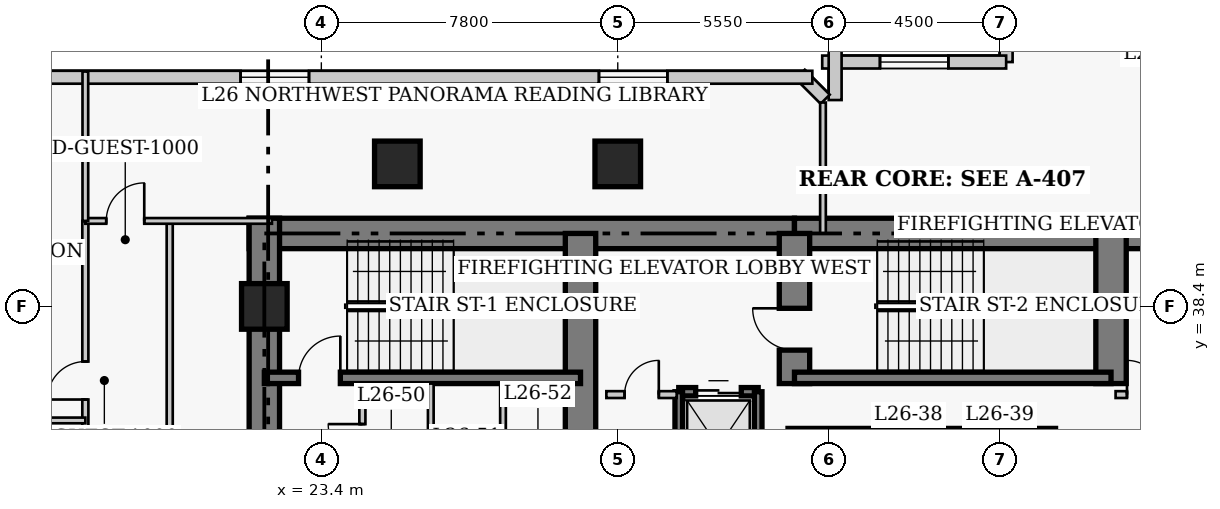
"""IFC4 building model, lengths in metres.
Left out: names, types, materials, properties, quantities, classifications, styles, units other than length and angle.
Written with IfcOpenShell. Run it as: python <this file> out.ifc"""

import sys

from ifc_helpers import new_model, si_unit, direction, frame, frame_2d, origin, origin_2d, place, context, subcontext, project, spatial, rectangle, extrude, element, fill, save


model = new_model("IFC4")
c1 = context("Model", 3, precision=1e-05, world=origin(), true_north=direction((0.0, 1.0)))
c2 = subcontext(c1, "Body", "Model", "MODEL_VIEW")
j1 = project(units=[si_unit("LENGTHUNIT", "METRE"), si_unit("PLANEANGLEUNIT", "RADIAN")], contexts=[c1])
p1 = place(None, origin())
s1 = spatial("IfcSite", under=j1, at=p1, CompositionType="ELEMENT")
p2 = place(p1, origin())
s2 = spatial("IfcBuilding", under=s1, at=p2, CompositionType="ELEMENT")
p3 = place(p2, frame((0.0, 0.0, 107.0)))
s3 = spatial("IfcBuildingStorey", under=s2, at=p3, CompositionType="ELEMENT", Elevation=107.0)
p4 = place(p3, frame((21.5, 40.32, 0.0), z_axis=(0.0, 0.0, 1.0), x_axis=(1.0, 0.0, 0.0)))
e1 = element("IfcWall", 1, at=p4, inside=s3, PredefinedType="SHEAR", context=c2, shape_type="SweptSolid", body=[
    extrude(rectangle(XDim=14.35, YDim=0.8, at=frame_2d((7.175, 0.0))), origin(), (0.0, 0.0, 1.0), 3.8),
])
p5 = place(p3, frame((35.85, 40.32, 0.0), z_axis=(0.0, 0.0, 1.0), x_axis=(1.0, 0.0, 0.0)))
e2 = element("IfcWall", 2, at=p5, inside=s3, PredefinedType="SHEAR", context=c2, shape_type="SweptSolid", body=[
    extrude(rectangle(XDim=12.6, YDim=0.8, at=frame_2d((6.3, 0.0))), origin(), (0.0, 0.0, 1.0), 3.8),
])
p6 = place(p3, frame((21.9, 27.05, 0.0), z_axis=(0.0, 0.0, 1.0), x_axis=(0.0, 1.0, 0.0)))
e3 = element("IfcWall", 3, at=p6, inside=s3, PredefinedType="SHEAR", context=c2, shape_type="SweptSolid", body=[
    extrude(rectangle(XDim=13.67, YDim=0.8, at=frame_2d((6.835, 0.0))), origin(), (0.0, 0.0, 1.0), 3.8),
])
p7 = place(p3, frame((30.22, 33.15, 0.0), z_axis=(0.0, 0.0, 1.0), x_axis=(0.0, 1.0, 0.0)))
e4 = element("IfcWall", 4, at=p7, inside=s3, PredefinedType="SHEAR", context=c2, shape_type="SweptSolid", body=[
    extrude(rectangle(XDim=7.17, YDim=0.8, at=frame_2d((3.585, 0.0))), origin(), (0.0, 0.0, 1.0), 3.8),
])
p8 = place(p3, frame((35.85, 36.37, 0.0), z_axis=(0.0, 0.0, 1.0), x_axis=(0.0, 1.0, 0.0)))
e5 = element("IfcWall", 5, at=p8, inside=s3, PredefinedType="SHEAR", context=c2, shape_type="SweptSolid", body=[
    extrude(rectangle(XDim=3.95, YDim=0.8, at=frame_2d((1.975, 0.0))), origin(), (0.0, 0.0, 1.0), 3.8),
])
p9 = place(p8, frame((0.88, 0.0, 0.0)))
e6 = element("IfcOpeningElement", 6, at=p9, cuts=e5, PredefinedType="OPENING", context=c2, shape_type="SweptSolid", body=[
    extrude(rectangle(XDim=1.1, YDim=2.15, at=frame_2d((0.55, 1.075))), frame((0.0, 0.41, 0.0), z_axis=(0.0, -1.0, 0.0), x_axis=(1.0, 0.0, 0.0)), (0.0, 0.0, 1.0), 0.82),
])
p10 = place(p3, frame((44.18, 36.37, 0.0), z_axis=(0.0, 0.0, 1.0), x_axis=(0.0, 1.0, 0.0)))
e7 = element("IfcWall", 7, at=p10, inside=s3, PredefinedType="SHEAR", context=c2, shape_type="SweptSolid", body=[
    extrude(rectangle(XDim=3.95, YDim=0.8, at=frame_2d((1.975, 0.0))), origin(), (0.0, 0.0, 1.0), 3.8),
])
p11 = place(p3, frame((21.9, 36.52, 0.0), z_axis=(0.0, 0.0, 1.0), x_axis=(1.0, 0.0, 0.0)))
e8 = element("IfcWall", 8, at=p11, inside=s3, PredefinedType="SHEAR", context=c2, shape_type="SweptSolid", body=[
    extrude(rectangle(XDim=8.32, YDim=0.3, at=frame_2d((4.16, 0.0))), origin(), (0.0, 0.0, 1.0), 3.8),
])
p12 = place(p11, frame((0.9, 0.0, 0.0)))
e9 = element("IfcOpeningElement", 9, at=p12, cuts=e8, PredefinedType="OPENING", context=c2, shape_type="SweptSolid", body=[
    extrude(rectangle(XDim=1.1, YDim=2.15, at=frame_2d((0.55, 1.075))), frame((0.0, 0.16, 0.0), z_axis=(0.0, -1.0, 0.0), x_axis=(1.0, 0.0, 0.0)), (0.0, 0.0, 1.0), 0.32),
])
p13 = place(p3, frame((35.85, 36.52, 0.0), z_axis=(0.0, 0.0, 1.0), x_axis=(1.0, 0.0, 0.0)))
e10 = element("IfcWall", 10, at=p13, inside=s3, PredefinedType="SHEAR", context=c2, shape_type="SweptSolid", body=[
    extrude(rectangle(XDim=8.33, YDim=0.3, at=frame_2d((4.165, 0.0))), origin(), (0.0, 0.0, 1.0), 3.8),
])
for number, where, z_axis, x_axis in (
    (11, (21.9, 38.4, 0.0), (0.0, 0.0, 1.0), (1.0, 0.0, 0.0)),
    (12, (25.4, 42.15, 0.0), (0.0, 0.0, 1.0), (1.0, 0.0, 0.0)),
    (13, (31.2, 42.15, 0.0), (0.0, 0.0, 1.0), (1.0, 0.0, 0.0)),
):
    element("IfcColumn", number, at=place(p3, frame(where, z_axis=z_axis, x_axis=x_axis)), inside=s3, PredefinedType="COLUMN", context=c2, shape_type="SweptSolid", body=[
        extrude(rectangle(XDim=1.2, YDim=1.2, at=origin_2d()), origin(), (0.0, 0.0, 1.0), 3.8),
    ])
p14 = place(p3, frame((41.42, 49.37, 0.0), z_axis=(0.0, 0.0, 1.0), x_axis=(0.0, -1.0, 0.0)))
e14 = element("IfcWall", 14, at=p14, inside=s3, PredefinedType="SOLIDWALL", context=c2, shape_type="SweptSolid", body=[
    extrude(rectangle(XDim=4.54, YDim=0.34, at=frame_2d((2.27, 0.0))), origin(), (0.0, 0.0, 1.0), 3.54),
])
p15 = place(p14, frame((1.37, 0.0, 0.85)))
e15 = element("IfcOpeningElement", 15, at=p15, cuts=e14, PredefinedType="OPENING", context=c2, shape_type="SweptSolid", body=[
    extrude(rectangle(XDim=1.8, YDim=1.8, at=frame_2d((0.9, 0.9))), frame((0.0, 0.18, 0.0), z_axis=(0.0, -1.0, 0.0), x_axis=(1.0, 0.0, 0.0)), (0.0, 0.0, 1.0), 0.36),
])
p16 = place(p3, frame((41.42, 44.83, 0.0), z_axis=(0.0, 0.0, 1.0), x_axis=(-1.0, 0.0, 0.0)))
e16 = element("IfcWall", 16, at=p16, inside=s3, PredefinedType="SOLIDWALL", context=c2, shape_type="SweptSolid", body=[
    extrude(rectangle(XDim=4.84, YDim=0.34, at=frame_2d((2.42, 0.0))), origin(), (0.0, 0.0, 1.0), 3.54),
])
p17 = place(p16, frame((1.52, 0.0, 0.85)))
e17 = element("IfcOpeningElement", 17, at=p17, cuts=e16, PredefinedType="OPENING", context=c2, shape_type="SweptSolid", body=[
    extrude(rectangle(XDim=1.8, YDim=1.8, at=frame_2d((0.9, 0.9))), frame((0.0, 0.18, 0.0), z_axis=(0.0, -1.0, 0.0), x_axis=(1.0, 0.0, 0.0)), (0.0, 0.0, 1.0), 0.36),
])
p18 = place(p3, frame((36.92, 45.17, 0.0), z_axis=(0.0, 0.0, 1.0), x_axis=(0.0, -1.0, 0.0)))
e18 = element("IfcWall", 18, at=p18, inside=s3, PredefinedType="SOLIDWALL", context=c2, shape_type="SweptSolid", body=[
    extrude(rectangle(XDim=1.34, YDim=0.34, at=frame_2d((0.67, 0.0))), origin(), (0.0, 0.0, 1.0), 3.54),
])
p19 = place(p3, frame((36.658, 43.852, 0.0), z_axis=(0.0, 0.0, 1.0), x_axis=(-0.707238225886, 0.706975312048, 0.0)))
e19 = element("IfcWall", 19, at=p19, inside=s3, PredefinedType="SOLIDWALL", context=c2, shape_type="SweptSolid", body=[
    extrude(rectangle(XDim=0.929, YDim=0.34, at=frame_2d((0.464, 0.0))), origin(), (0.0, 0.0, 1.0), 3.54),
])
p20 = place(p3, frame((36.32, 44.43, 0.0), z_axis=(0.0, 0.0, 1.0), x_axis=(-1.0, 0.0, 0.0)))
e20 = element("IfcWall", 20, at=p20, inside=s3, PredefinedType="SOLIDWALL", context=c2, shape_type="SweptSolid", body=[
    extrude(rectangle(XDim=28.29, YDim=0.34, at=frame_2d((14.145, 0.0))), origin(), (0.0, 0.0, 1.0), 3.54),
])
p21 = place(p20, frame((3.815, 0.0, 0.85)))
e21 = element("IfcOpeningElement", 21, at=p21, cuts=e20, PredefinedType="OPENING", context=c2, shape_type="SweptSolid", body=[
    extrude(rectangle(XDim=1.8, YDim=1.8, at=frame_2d((0.9, 0.9))), frame((0.0, 0.18, 0.0), z_axis=(0.0, -1.0, 0.0), x_axis=(1.0, 0.0, 0.0)), (0.0, 0.0, 1.0), 0.36),
])
p22 = place(p20, frame((13.245, 0.0, 0.85)))
e22 = element("IfcOpeningElement", 22, at=p22, cuts=e20, PredefinedType="OPENING", context=c2, shape_type="SweptSolid", body=[
    extrude(rectangle(XDim=1.8, YDim=1.8, at=frame_2d((0.9, 0.9))), frame((0.0, 0.18, 0.0), z_axis=(0.0, -1.0, 0.0), x_axis=(1.0, 0.0, 0.0)), (0.0, 0.0, 1.0), 0.36),
])
p23 = place(p20, frame((22.675, 0.0, 0.85)))
e23 = element("IfcOpeningElement", 23, at=p23, cuts=e20, PredefinedType="OPENING", context=c2, shape_type="SweptSolid", body=[
    extrude(rectangle(XDim=1.8, YDim=1.8, at=frame_2d((0.9, 0.9))), frame((0.0, 0.18, 0.0), z_axis=(0.0, -1.0, 0.0), x_axis=(1.0, 0.0, 0.0)), (0.0, 0.0, 1.0), 0.36),
])
p24 = place(p3, frame((35.68, 35.08, 0.0), z_axis=(0.0, 0.0, 1.0), x_axis=(1.0, 0.0, 0.0)))
e24 = element("IfcWall", 24, at=p24, inside=s3, PredefinedType="SHEAR", context=c2, shape_type="SweptSolid", body=[
    extrude(rectangle(XDim=2.32, YDim=0.22, at=frame_2d((1.16, 0.0))), origin(), (0.0, 0.0, 1.0), 3.8),
])
p25 = place(p3, frame((38.0, 35.08, 0.0), z_axis=(0.0, 0.0, 1.0), x_axis=(1.0, 0.0, 0.0)))
e25 = element("IfcWall", 25, at=p25, inside=s3, PredefinedType="SHEAR", context=c2, shape_type="SweptSolid", body=[
    extrude(rectangle(XDim=2.4, YDim=0.22, at=frame_2d((1.2, 0.0))), origin(), (0.0, 0.0, 1.0), 3.8),
])
p26 = place(p3, frame((40.4, 35.08, 0.0), z_axis=(0.0, 0.0, 1.0), x_axis=(1.0, 0.0, 0.0)))
e26 = element("IfcWall", 26, at=p26, inside=s3, PredefinedType="SHEAR", context=c2, shape_type="SweptSolid", body=[
    extrude(rectangle(XDim=2.32, YDim=0.22, at=frame_2d((1.16, 0.0))), origin(), (0.0, 0.0, 1.0), 3.8),
])
p27 = place(p3, frame((32.805, 36.155, 0.0), z_axis=(0.0, 0.0, 1.0), x_axis=(1.0, 0.0, 0.0)))
e27 = element("IfcWall", 27, at=p27, inside=s3, PredefinedType="SHEAR", context=c2, shape_type="SweptSolid", body=[
    extrude(rectangle(XDim=2.09, YDim=0.22, at=frame_2d((1.045, 0.0))), origin(), (0.0, 0.0, 1.0), 3.8),
])
p28 = place(p27, frame((0.445, 0.0, 0.0)))
e28 = element("IfcOpeningElement", 28, at=p28, cuts=e27, PredefinedType="OPENING", context=c2, shape_type="SweptSolid", body=[
    extrude(rectangle(XDim=1.2, YDim=2.15, at=frame_2d((0.6, 1.075))), frame((0.0, 0.12, 0.0), z_axis=(0.0, -1.0, 0.0), x_axis=(1.0, 0.0, 0.0)), (0.0, 0.0, 1.0), 0.24),
])
for number, where, z_axis, x_axis in (
    (29, (32.805, 33.245, 0.0), (0.0, 0.0, 1.0), (0.0, 1.0, 0.0)),
    (30, (34.895, 33.245, 0.0), (0.0, 0.0, 1.0), (0.0, 1.0, 0.0)),
):
    element("IfcWall", number, at=place(p3, frame(where, z_axis=z_axis, x_axis=x_axis)), inside=s3, PredefinedType="SHEAR", context=c2, shape_type="SweptSolid", body=[
        extrude(rectangle(XDim=2.91, YDim=0.2, at=frame_2d((1.455, 0.0))), origin(), (0.0, 0.0, 1.0), 3.8),
    ])
p29 = place(p3, frame((30.9, 36.08, 0.0), z_axis=(0.0, 0.0, 1.0), x_axis=(1.0, 0.0, 0.0)))
e31 = element("IfcWall", 31, at=p29, inside=s3, PredefinedType="PARTITIONING", context=c2, shape_type="SweptSolid", body=[
    extrude(rectangle(XDim=1.85, YDim=0.18, at=frame_2d((0.925, 0.0))), origin(), (0.0, 0.0, 1.0), 3.54),
])
p30 = place(p29, frame((0.48, 0.0, 0.0)))
e32 = element("IfcOpeningElement", 32, at=p30, cuts=e31, PredefinedType="OPENING", context=c2, shape_type="SweptSolid", body=[
    extrude(rectangle(XDim=0.9, YDim=2.15, at=frame_2d((0.45, 1.075))), frame((0.0, 0.1, 0.0), z_axis=(0.0, -1.0, 0.0), x_axis=(1.0, 0.0, 0.0)), (0.0, 0.0, 1.0), 0.2),
])
p31 = place(p3, frame((44.3, 36.08, 0.0), z_axis=(0.0, 0.0, 1.0), x_axis=(1.0, 0.0, 0.0)))
e33 = element("IfcWall", 33, at=p31, inside=s3, PredefinedType="PARTITIONING", context=c2, shape_type="SweptSolid", body=[
    extrude(rectangle(XDim=1.5, YDim=0.18, at=frame_2d((0.75, 0.0))), origin(), (0.0, 0.0, 1.0), 3.54),
])
p32 = place(p31, frame((0.3, 0.0, 0.0)))
e34 = element("IfcOpeningElement", 34, at=p32, cuts=e33, PredefinedType="OPENING", context=c2, shape_type="SweptSolid", body=[
    extrude(rectangle(XDim=0.9, YDim=2.15, at=frame_2d((0.45, 1.075))), frame((0.0, 0.1, 0.0), z_axis=(0.0, -1.0, 0.0), x_axis=(1.0, 0.0, 0.0)), (0.0, 0.0, 1.0), 0.2),
])
p33 = place(p3, frame((24.48, 32.8, 0.0), z_axis=(0.0, 0.0, 1.0), x_axis=(0.0, 1.0, 0.0)))
e35 = element("IfcWall", 35, at=p33, inside=s3, PredefinedType="PARTITIONING", context=c2, shape_type="SweptSolid", body=[
    extrude(rectangle(XDim=3.57, YDim=0.16, at=frame_2d((1.785, 0.0))), origin(), (0.0, 0.0, 1.0), 3.54),
])
p34 = place(p33, frame((1.604, 0.0, 0.0)))
e36 = element("IfcOpeningElement", 36, at=p34, cuts=e35, PredefinedType="OPENING", context=c2, shape_type="SweptSolid", body=[
    extrude(rectangle(XDim=0.9, YDim=2.1, at=frame_2d((0.45, 1.05))), frame((0.0, 0.09, 0.0), z_axis=(0.0, -1.0, 0.0), x_axis=(1.0, 0.0, 0.0)), (0.0, 0.0, 1.0), 0.18),
])
for number, where, z_axis, x_axis in (
    (37, (26.28, 32.75, 0.0), (0.0, 0.0, 1.0), (0.0, 1.0, 0.0)),
    (38, (28.18, 32.75, 0.0), (0.0, 0.0, 1.0), (0.0, 1.0, 0.0)),
):
    element("IfcWall", number, at=place(p3, frame(where, z_axis=z_axis, x_axis=x_axis)), inside=s3, PredefinedType="PARTITIONING", context=c2, shape_type="SweptSolid", body=[
        extrude(rectangle(XDim=3.62, YDim=0.15, at=frame_2d((1.81, 0.0))), origin(), (0.0, 0.0, 1.0), 3.54),
    ])
p35 = place(p3, frame((17.19, 6.65, 0.0), z_axis=(0.0, 0.0, 1.0), x_axis=(0.0, 1.0, 0.0)))
e39 = element("IfcWall", 39, at=p35, inside=s3, PredefinedType="PARTITIONING", context=c2, shape_type="SweptSolid", body=[
    extrude(rectangle(XDim=34.0, YDim=0.16, at=frame_2d((17.0, 0.0))), origin(), (0.0, 0.0, 1.0), 3.54),
])
p36 = place(p35, frame((1.8, 0.0, 0.0)))
e40 = element("IfcOpeningElement", 40, at=p36, cuts=e39, PredefinedType="OPENING", context=c2, shape_type="SweptSolid", body=[
    extrude(rectangle(XDim=0.95, YDim=2.1, at=frame_2d((0.475, 1.05))), frame((0.0, 0.09, 0.0), z_axis=(0.0, -1.0, 0.0), x_axis=(1.0, 0.0, 0.0)), (0.0, 0.0, 1.0), 0.18),
])
p37 = place(p35, frame((8.475, 0.0, 0.0)))
e41 = element("IfcOpeningElement", 41, at=p37, cuts=e39, PredefinedType="OPENING", context=c2, shape_type="SweptSolid", body=[
    extrude(rectangle(XDim=0.95, YDim=2.1, at=frame_2d((0.475, 1.05))), frame((0.0, 0.09, 0.0), z_axis=(0.0, -1.0, 0.0), x_axis=(1.0, 0.0, 0.0)), (0.0, 0.0, 1.0), 0.18),
])
p38 = place(p35, frame((17.275, 0.0, 0.0)))
e42 = element("IfcOpeningElement", 42, at=p38, cuts=e39, PredefinedType="OPENING", context=c2, shape_type="SweptSolid", body=[
    extrude(rectangle(XDim=0.95, YDim=2.1, at=frame_2d((0.475, 1.05))), frame((0.0, 0.09, 0.0), z_axis=(0.0, -1.0, 0.0), x_axis=(1.0, 0.0, 0.0)), (0.0, 0.0, 1.0), 0.18),
])
p39 = place(p35, frame((24.975, 0.0, 0.0)))
e43 = element("IfcOpeningElement", 43, at=p39, cuts=e39, PredefinedType="OPENING", context=c2, shape_type="SweptSolid", body=[
    extrude(rectangle(XDim=0.95, YDim=2.1, at=frame_2d((0.475, 1.05))), frame((0.0, 0.09, 0.0), z_axis=(0.0, -1.0, 0.0), x_axis=(1.0, 0.0, 0.0)), (0.0, 0.0, 1.0), 0.18),
])
p40 = place(p35, frame((29.3, 0.0, 0.0)))
e44 = element("IfcOpeningElement", 44, at=p40, cuts=e39, PredefinedType="OPENING", context=c2, shape_type="SweptSolid", body=[
    extrude(rectangle(XDim=1.0, YDim=2.15, at=frame_2d((0.5, 1.075))), frame((0.0, 0.09, 0.0), z_axis=(0.0, -1.0, 0.0), x_axis=(1.0, 0.0, 0.0)), (0.0, 0.0, 1.0), 0.18),
])
p41 = place(p3, frame((19.41, 35.02, 0.0), z_axis=(0.0, 0.0, 1.0), x_axis=(0.0, 1.0, 0.0)))
e45 = element("IfcWall", 45, at=p41, inside=s3, PredefinedType="PARTITIONING", context=c2, shape_type="SweptSolid", body=[
    extrude(rectangle(XDim=5.63, YDim=0.16, at=frame_2d((2.815, 0.0))), origin(), (0.0, 0.0, 1.0), 3.54),
])
p42 = place(p3, frame((17.19, 40.65, 0.0), z_axis=(0.0, 0.0, 1.0), x_axis=(1.0, 0.0, 0.0)))
e46 = element("IfcWall", 46, at=p42, inside=s3, PredefinedType="PARTITIONING", context=c2, shape_type="SweptSolid", body=[
    extrude(rectangle(XDim=4.91, YDim=0.15, at=frame_2d((2.455, 0.0))), origin(), (0.0, 0.0, 1.0), 3.54),
])
p43 = place(p42, frame((0.55, 0.0, 0.0)))
e47 = element("IfcOpeningElement", 47, at=p43, cuts=e46, PredefinedType="OPENING", context=c2, shape_type="SweptSolid", body=[
    extrude(rectangle(XDim=1.0, YDim=2.15, at=frame_2d((0.5, 1.075))), frame((0.0, 0.085, 0.0), z_axis=(0.0, -1.0, 0.0), x_axis=(1.0, 0.0, 0.0)), (0.0, 0.0, 1.0), 0.17),
])
p44 = place(p3, frame((17.19, 40.65, 0.0), z_axis=(0.0, 0.0, 1.0), x_axis=(0.0, 1.0, 0.0)))
e48 = element("IfcWall", 48, at=p44, inside=s3, PredefinedType="PARTITIONING", context=c2, shape_type="SweptSolid", body=[
    extrude(rectangle(XDim=3.93, YDim=0.15, at=frame_2d((1.965, 0.0))), origin(), (0.0, 0.0, 1.0), 3.54),
])
p45 = place(p3, frame((36.6, 40.32, 0.0), z_axis=(0.0, 0.0, 1.0), x_axis=(0.0, 1.0, 0.0)))
e49 = element("IfcWall", 49, at=p45, inside=s3, PredefinedType="PARTITIONING", context=c2, shape_type="SweptSolid", body=[
    extrude(rectangle(XDim=3.445, YDim=0.15, at=frame_2d((1.723, 0.0))), origin(), (0.0, 0.0, 1.0), 3.54),
])
p46 = place(p3, frame((14.45, 35.4, 0.0), z_axis=(0.0, 0.0, 1.0), x_axis=(1.0, 0.0, 0.0)))
e50 = element("IfcWall", 50, at=p46, inside=s3, PredefinedType="PARTITIONING", context=c2, shape_type="SweptSolid", body=[
    extrude(rectangle(XDim=2.74, YDim=0.15, at=frame_2d((1.37, 0.0))), origin(), (0.0, 0.0, 1.0), 3.54),
])
p47 = place(p17, origin())
e51 = element("IfcWindow", 51, at=p47, inside=s3, PartitioningType="SINGLE_PANEL", PredefinedType="WINDOW", context=c2, shape_type="SweptSolid", body=[
    extrude(rectangle(XDim=1.8, YDim=1.8, at=frame_2d((0.9, 0.9))), frame((0.0, 0.03, 0.0), z_axis=(0.0, -1.0, 0.0), x_axis=(1.0, 0.0, 0.0)), (0.0, 0.0, 1.0), 0.06),
])
fill(e17, e51)
p48 = place(p21, origin())
e52 = element("IfcWindow", 52, at=p48, inside=s3, PartitioningType="SINGLE_PANEL", PredefinedType="WINDOW", context=c2, shape_type="SweptSolid", body=[
    extrude(rectangle(XDim=1.8, YDim=1.8, at=frame_2d((0.9, 0.9))), frame((0.0, 0.03, 0.0), z_axis=(0.0, -1.0, 0.0), x_axis=(1.0, 0.0, 0.0)), (0.0, 0.0, 1.0), 0.06),
])
fill(e21, e52)
p49 = place(p22, origin())
e53 = element("IfcWindow", 53, at=p49, inside=s3, PartitioningType="SINGLE_PANEL", PredefinedType="WINDOW", context=c2, shape_type="SweptSolid", body=[
    extrude(rectangle(XDim=1.8, YDim=1.8, at=frame_2d((0.9, 0.9))), frame((0.0, 0.03, 0.0), z_axis=(0.0, -1.0, 0.0), x_axis=(1.0, 0.0, 0.0)), (0.0, 0.0, 1.0), 0.06),
])
fill(e22, e53)
p50 = place(p28, origin())
e54 = element("IfcDoor", 54, at=p50, inside=s3, OperationType="DOUBLE_DOOR_SLIDING", PredefinedType="DOOR", context=c2, shape_type="SweptSolid", body=[
    extrude(rectangle(XDim=1.2, YDim=2.15, at=frame_2d((0.6, 1.075))), frame((0.0, 0.025, 0.0), z_axis=(0.0, -1.0, 0.0), x_axis=(1.0, 0.0, 0.0)), (0.0, 0.0, 1.0), 0.05),
])
fill(e28, e54)
p51 = place(p30, origin())
e55 = element("IfcDoor", 55, at=p51, inside=s3, OperationType="SINGLE_SWING_RIGHT", PredefinedType="DOOR", context=c2, shape_type="SweptSolid", body=[
    extrude(rectangle(XDim=0.9, YDim=2.15, at=frame_2d((0.45, 1.075))), frame((0.0, 0.025, 0.0), z_axis=(0.0, -1.0, 0.0), x_axis=(1.0, 0.0, 0.0)), (0.0, 0.0, 1.0), 0.05),
])
fill(e32, e55)
p52 = place(p32, origin())
e56 = element("IfcDoor", 56, at=p52, inside=s3, OperationType="SINGLE_SWING_LEFT", PredefinedType="DOOR", context=c2, shape_type="SweptSolid", body=[
    extrude(rectangle(XDim=0.9, YDim=2.15, at=frame_2d((0.45, 1.075))), frame((0.0, 0.025, 0.0), z_axis=(0.0, -1.0, 0.0), x_axis=(1.0, 0.0, 0.0)), (0.0, 0.0, 1.0), 0.05),
])
fill(e34, e56)
p53 = place(p34, origin())
e57 = element("IfcDoor", 57, at=p53, inside=s3, OperationType="SINGLE_SWING_RIGHT", PredefinedType="DOOR", context=c2, shape_type="SweptSolid", body=[
    extrude(rectangle(XDim=0.9, YDim=2.1, at=frame_2d((0.45, 1.05))), frame((0.0, 0.025, 0.0), z_axis=(0.0, -1.0, 0.0), x_axis=(1.0, 0.0, 0.0)), (0.0, 0.0, 1.0), 0.05),
])
fill(e36, e57)
p54 = place(p43, origin())
e58 = element("IfcDoor", 58, at=p54, inside=s3, OperationType="SINGLE_SWING_RIGHT", PredefinedType="DOOR", context=c2, shape_type="SweptSolid", body=[
    extrude(rectangle(XDim=1.0, YDim=2.15, at=frame_2d((0.5, 1.075))), frame((0.0, 0.025, 0.0), z_axis=(0.0, -1.0, 0.0), x_axis=(1.0, 0.0, 0.0)), (0.0, 0.0, 1.0), 0.05),
])
fill(e47, e58)
p55 = place(p40, origin())
e59 = element("IfcDoor", 59, at=p55, inside=s3, OperationType="SINGLE_SWING_LEFT", PredefinedType="DOOR", context=c2, shape_type="SweptSolid", body=[
    extrude(rectangle(XDim=1.0, YDim=2.15, at=frame_2d((0.5, 1.075))), frame((0.0, 0.025, 0.0), z_axis=(0.0, -1.0, 0.0), x_axis=(1.0, 0.0, 0.0)), (0.0, 0.0, 1.0), 0.05),
])
fill(e44, e59)
p56 = place(p12, origin())
e60 = element("IfcDoor", 60, at=p56, inside=s3, OperationType="SINGLE_SWING_RIGHT", PredefinedType="DOOR", context=c2, shape_type="SweptSolid", body=[
    extrude(rectangle(XDim=1.1, YDim=2.15, at=frame_2d((0.55, 1.075))), frame((0.0, 0.025, 0.0), z_axis=(0.0, -1.0, 0.0), x_axis=(1.0, 0.0, 0.0)), (0.0, 0.0, 1.0), 0.05),
])
fill(e9, e60)
p57 = place(p9, origin())
e61 = element("IfcDoor", 61, at=p57, inside=s3, OperationType="SINGLE_SWING_RIGHT", PredefinedType="DOOR", context=c2, shape_type="SweptSolid", body=[
    extrude(rectangle(XDim=1.1, YDim=2.15, at=frame_2d((0.55, 1.075))), frame((0.0, 0.025, 0.0), z_axis=(0.0, -1.0, 0.0), x_axis=(1.0, 0.0, 0.0)), (0.0, 0.0, 1.0), 0.05),
])
fill(e6, e61)
save(model, sys.argv[1])
